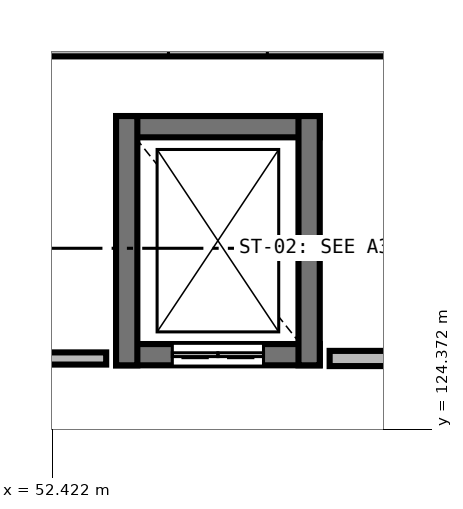
"""IFC4 building model, lengths in metres.
Left out: names, types, materials, properties, quantities, classifications, styles, units other than length and angle.
Written with IfcOpenShell. Run it as: python <this file> out.ifc"""

import sys

from ifc_helpers import new_model, si_unit, direction, frame, frame_2d, origin, place, context, subcontext, project, spatial, rectangle, extrude, element, fill, save


model = new_model("IFC4")
c1 = context("Model", 3, precision=1e-05, world=origin(), true_north=direction((0.0, 1.0)))
c2 = subcontext(c1, "Body", "Model", "MODEL_VIEW")
j1 = project(units=[si_unit("LENGTHUNIT", "METRE"), si_unit("PLANEANGLEUNIT", "RADIAN")], contexts=[c1])
p1 = place(None, origin())
s1 = spatial("IfcSite", under=j1, at=p1, CompositionType="ELEMENT")
p2 = place(p1, origin())
s2 = spatial("IfcBuilding", under=s1, at=p2, CompositionType="ELEMENT")
p3 = place(p2, frame((0.0, 0.0, 17.7)))
s3 = spatial("IfcBuildingStorey", under=s2, at=p3, CompositionType="ELEMENT", Elevation=17.7)
p4 = place(p3, frame((50.648, 129.43, 0.0), z_axis=(0.0, 0.0, 1.0), x_axis=(1.0, 0.0, 0.0)))
e1 = element("IfcWall", 1, at=p4, inside=s3, PredefinedType="SOLIDWALL", context=c2, shape_type="SweptSolid", body=[
    extrude(rectangle(XDim=7.904, YDim=0.31, at=frame_2d((3.952, 0.0))), origin(), (0.0, 0.0, 1.0), 3.25),
])
p5 = place(p4, frame((1.301, 0.0, 0.95)))
e2 = element("IfcOpeningElement", 2, at=p5, cuts=e1, PredefinedType="OPENING", context=c2, shape_type="SweptSolid", body=[
    extrude(rectangle(XDim=2.0, YDim=1.5, at=frame_2d((1.0, 0.75))), frame((0.0, 0.165, 0.0), z_axis=(0.0, -1.0, 0.0), x_axis=(1.0, 0.0, 0.0)), (0.0, 0.0, 1.0), 0.33),
])
p6 = place(p4, frame((4.603, 0.0, 0.95)))
e3 = element("IfcOpeningElement", 3, at=p6, cuts=e1, PredefinedType="OPENING", context=c2, shape_type="SweptSolid", body=[
    extrude(rectangle(XDim=2.0, YDim=1.5, at=frame_2d((1.0, 0.75))), frame((0.0, 0.165, 0.0), z_axis=(0.0, -1.0, 0.0), x_axis=(1.0, 0.0, 0.0)), (0.0, 0.0, 1.0), 0.33),
])
p7 = place(p3, frame((55.94, 125.35, 0.0), z_axis=(0.0, 0.0, 1.0), x_axis=(-1.0, 0.0, 0.0)))
e4 = element("IfcWall", 4, at=p7, inside=s3, PredefinedType="SHEAR", context=c2, shape_type="SweptSolid", body=[
    extrude(rectangle(XDim=2.68, YDim=0.28, at=frame_2d((1.34, 0.0))), origin(), (0.0, 0.0, 1.0), 3.88),
])
p8 = place(p7, frame((0.74, 0.0, 0.0)))
e5 = element("IfcOpeningElement", 5, at=p8, cuts=e4, PredefinedType="OPENING", context=c2, shape_type="SweptSolid", body=[
    extrude(rectangle(XDim=1.2, YDim=2.15, at=frame_2d((0.6, 1.075))), frame((0.0, 0.15, 0.0), z_axis=(0.0, -1.0, 0.0), x_axis=(1.0, 0.0, 0.0)), (0.0, 0.0, 1.0), 0.3),
])
p9 = place(p3, frame((53.26, 128.35, 0.0), z_axis=(0.0, 0.0, 1.0), x_axis=(1.0, 0.0, 0.0)))
e6 = element("IfcWall", 6, at=p9, inside=s3, PredefinedType="SHEAR", context=c2, shape_type="SweptSolid", body=[
    extrude(rectangle(XDim=2.68, YDim=0.28, at=frame_2d((1.34, 0.0))), origin(), (0.0, 0.0, 1.0), 3.88),
])
for number, where, z_axis, x_axis in (
    (7, (53.4, 125.21, 0.0), (0.0, 0.0, 1.0), (0.0, 1.0, 0.0)),
    (8, (55.8, 128.49, 0.0), (0.0, 0.0, 1.0), (0.0, -1.0, 0.0)),
):
    element("IfcWall", number, at=place(p3, frame(where, z_axis=z_axis, x_axis=x_axis)), inside=s3, PredefinedType="SHEAR", context=c2, shape_type="SweptSolid", body=[
        extrude(rectangle(XDim=3.28, YDim=0.28, at=frame_2d((1.64, 0.0))), origin(), (0.0, 0.0, 1.0), 3.88),
    ])
p10 = place(p3, frame((42.0, 125.3, 0.0), z_axis=(0.0, 0.0, 1.0), x_axis=(1.0, 0.0, 0.0)))
e9 = element("IfcWall", 9, at=p10, inside=s3, PredefinedType="PARTITIONING", context=c2, shape_type="SweptSolid", body=[
    extrude(rectangle(XDim=11.13, YDim=0.16, at=frame_2d((5.565, 0.0))), origin(), (0.0, 0.0, 1.0), 3.355),
])
p11 = place(p10, frame((3.6, 0.0, 0.0)))
e10 = element("IfcOpeningElement", 10, at=p11, cuts=e9, PredefinedType="OPENING", context=c2, shape_type="SweptSolid", body=[
    extrude(rectangle(XDim=1.2, YDim=2.15, at=frame_2d((0.6, 1.075))), frame((0.0, 0.09, 0.0), z_axis=(0.0, -1.0, 0.0), x_axis=(1.0, 0.0, 0.0)), (0.0, 0.0, 1.0), 0.18),
])
p12 = place(p3, frame((56.07, 125.3, 0.0), z_axis=(0.0, 0.0, 1.0), x_axis=(1.0, 0.0, 0.0)))
e11 = element("IfcWall", 11, at=p12, inside=s3, PredefinedType="SOLIDWALL", context=c2, shape_type="SweptSolid", body=[
    extrude(rectangle(XDim=19.53, YDim=0.2, at=frame_2d((9.765, 0.0))), origin(), (0.0, 0.0, 1.0), 3.355),
])
p13 = place(p8, origin())
e12 = element("IfcDoor", 12, at=p13, inside=s3, OperationType="DOUBLE_DOOR_SLIDING", PredefinedType="DOOR", context=c2, shape_type="SweptSolid", body=[
    extrude(rectangle(XDim=1.2, YDim=2.15, at=frame_2d((0.6, 1.075))), frame((0.0, 0.025, 0.0), z_axis=(0.0, -1.0, 0.0), x_axis=(1.0, 0.0, 0.0)), (0.0, 0.0, 1.0), 0.05),
])
fill(e5, e12)
save(model, sys.argv[1])
